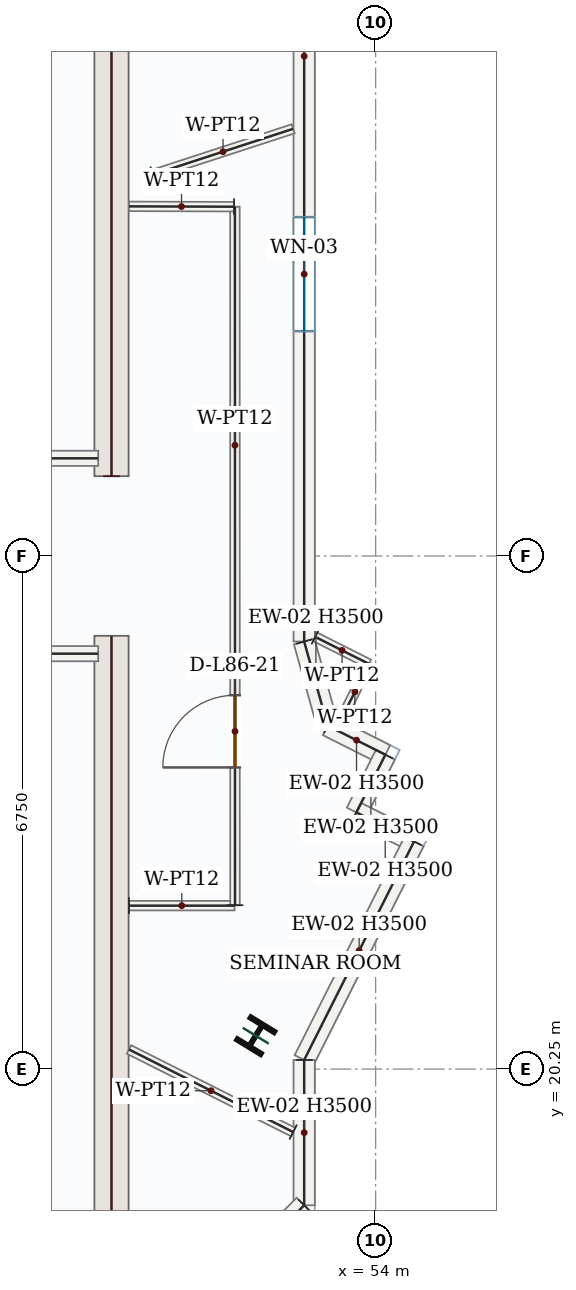
"""IFC4 building model, lengths in metres.
Left out: names, types, materials, properties, quantities, classifications, styles, units other than length and angle.
Written with IfcOpenShell. Run it as: python <this file> out.ifc"""

import sys

from ifc_helpers import new_model, si_unit, direction, frame, frame_2d, origin, origin_2d, place, context, subcontext, project, spatial, rectangle, i_section, extrude, source, transform, mapped, element, fill, save


model = new_model("IFC4")
c1 = context("Model", 3, precision=1e-05, world=origin(), true_north=direction((0.0, 1.0)))
c2 = subcontext(c1, "Body", "Model", "MODEL_VIEW")
j1 = project(units=[si_unit("LENGTHUNIT", "METRE"), si_unit("PLANEANGLEUNIT", "RADIAN")], contexts=[c1])
p1 = place(None, origin())
s1 = spatial("IfcSite", under=j1, at=p1, CompositionType="ELEMENT")
p2 = place(p1, origin())
s2 = spatial("IfcBuilding", under=s1, at=p2, CompositionType="ELEMENT")
p3 = place(p2, frame((0.0, 0.0, 353.55)))
s3 = spatial("IfcBuildingStorey", under=s2, at=p3, CompositionType="ELEMENT", Elevation=353.55)
m1 = source(origin(), c2, "Body", "SweptSolid", [
    extrude(rectangle(XDim=8.55, YDim=0.45, at=frame_2d((4.275, 0.0))), origin(), (0.0, 0.0, 1.0), 3.5),
])
for number, where, z_axis, x_axis in (
    (1, (50.525, 17.4, 0.0), (0.0, 0.0, 1.0), (0.0, 1.0, 0.0)),
    (2, (50.525, 28.05, 0.0), (0.0, 0.0, 1.0), (0.0, 1.0, 0.0)),
):
    element("IfcWall", number, at=place(p3, frame(where, z_axis=z_axis, x_axis=x_axis)), inside=s3, PredefinedType="SHEAR", context=c2, shape_type="MappedRepresentation", body=[
        mapped(m1, transform((0.0, 0.0, 0.0), x_axis=(1.0, 0.0, 0.0), y_axis=(0.0, 1.0, 0.0), z_axis=(0.0, 0.0, 1.0), scale=1.0)),
    ])
m2 = source(origin(), c2, "Body", "SweptSolid", [
    extrude(i_section(OverallWidth=0.369, OverallDepth=0.356, WebThickness=0.011, FlangeThickness=0.018, FilletRadius=0.018, at=origin_2d()), origin(), (0.0, 0.0, 1.0), 3.75),
])
p4 = place(p3, frame((52.423, 20.689, 0.0), z_axis=(0.0, 0.0, 1.0), x_axis=(-0.852640164354, 0.522498564716, 0.0)))
e3 = element("IfcColumn", 3, at=p4, inside=s3, PredefinedType="COLUMN", context=c2, shape_type="MappedRepresentation", body=[
    mapped(m2, transform((0.0, 0.0, 0.0), x_axis=(1.0, 0.0, 0.0), y_axis=(0.0, 1.0, 0.0), z_axis=(0.0, 0.0, 1.0), scale=1.0)),
])
p5 = place(p3, frame((53.06, 35.542, 0.0), z_axis=(0.0, 0.0, 1.0), x_axis=(0.0, -1.0, 0.0)))
e4 = element("IfcWall", 4, at=p5, inside=s3, PredefinedType="SOLIDWALL", context=c2, shape_type="SweptSolid", body=[
    extrude(rectangle(XDim=9.667, YDim=0.28, at=frame_2d((4.834, 0.0))), origin(), (0.0, 0.0, 1.0), 3.5),
])
p6 = place(p5, frame((4.084, 0.0, 0.85)))
e5 = element("IfcOpeningElement", 5, at=p6, cuts=e4, PredefinedType="OPENING", context=c2, shape_type="SweptSolid", body=[
    extrude(rectangle(XDim=1.5, YDim=1.5, at=frame_2d((0.75, 0.75))), frame((0.0, 0.15, 0.0), z_axis=(0.0, -1.0, 0.0), x_axis=(1.0, 0.0, 0.0)), (0.0, 0.0, 1.0), 0.3),
])
m3 = source(origin(), c2, "Body", "SweptSolid", [
    extrude(rectangle(XDim=1.149, YDim=0.28, at=frame_2d((0.575, 0.0))), origin(), (0.0, 0.0, 1.0), 3.5),
])
p7 = place(p3, frame((53.06, 25.875, 0.0), z_axis=(0.0, 0.0, 1.0), x_axis=(0.268739381154, -0.963212928182, 0.0)))
e6 = element("IfcWall", 6, at=p7, inside=s3, PredefinedType="SOLIDWALL", context=c2, shape_type="MappedRepresentation", body=[
    mapped(m3, transform((0.0, 0.0, 0.0), x_axis=(1.0, 0.0, 0.0), y_axis=(0.0, 1.0, 0.0), z_axis=(0.0, 0.0, 1.0), scale=1.0)),
])
m4 = source(origin(), c2, "Body", "SweptSolid", [
    extrude(rectangle(XDim=0.85, YDim=0.28, at=frame_2d((0.425, 0.0))), origin(), (0.0, 0.0, 1.0), 3.5),
])
p8 = place(p3, frame((53.369, 24.768, 0.0), z_axis=(0.0, 0.0, 1.0), x_axis=(0.893448612452, -0.449165422653, 0.0)))
e7 = element("IfcWall", 7, at=p8, inside=s3, PredefinedType="SOLIDWALL", context=c2, shape_type="MappedRepresentation", body=[
    mapped(m4, transform((0.0, 0.0, 0.0), x_axis=(1.0, 0.0, 0.0), y_axis=(0.0, 1.0, 0.0), z_axis=(0.0, 0.0, 1.0), scale=1.0)),
])
m5 = source(origin(), c2, "Body", "SweptSolid", [
    extrude(rectangle(XDim=0.85, YDim=0.28, at=frame_2d((0.425, 0.0))), origin(), (0.0, 0.0, 1.0), 3.5),
])
p9 = place(p3, frame((54.128, 24.386, 0.0), z_axis=(0.0, 0.0, 1.0), x_axis=(-0.449280699695, -0.89339064965, 0.0)))
e8 = element("IfcWall", 8, at=p9, inside=s3, PredefinedType="SOLIDWALL", context=c2, shape_type="MappedRepresentation", body=[
    mapped(m5, transform((0.0, 0.0, 0.0), x_axis=(1.0, 0.0, 0.0), y_axis=(0.0, 1.0, 0.0), z_axis=(0.0, 0.0, 1.0), scale=1.0)),
])
p10 = place(p3, frame((53.747, 23.626, 0.0), z_axis=(0.0, 0.0, 1.0), x_axis=(0.893275332233, -0.449509934066, 0.0)))
e9 = element("IfcWall", 9, at=p10, inside=s3, PredefinedType="SOLIDWALL", context=c2, shape_type="MappedRepresentation", body=[
    mapped(m4, transform((0.0, 0.0, 0.0), x_axis=(1.0, 0.0, 0.0), y_axis=(0.0, 1.0, 0.0), z_axis=(0.0, 0.0, 1.0), scale=1.0)),
])
m6 = source(origin(), c2, "Body", "SweptSolid", [
    extrude(rectangle(XDim=3.218, YDim=0.28, at=frame_2d((1.609, 0.0))), origin(), (0.0, 0.0, 1.0), 3.5),
])
p11 = place(p3, frame((54.506, 23.244, 0.0), z_axis=(0.0, 0.0, 1.0), x_axis=(-0.449336858059, -0.89336240574, 0.0)))
e10 = element("IfcWall", 10, at=p11, inside=s3, PredefinedType="SOLIDWALL", context=c2, shape_type="MappedRepresentation", body=[
    mapped(m6, transform((0.0, 0.0, 0.0), x_axis=(1.0, 0.0, 0.0), y_axis=(0.0, 1.0, 0.0), z_axis=(0.0, 0.0, 1.0), scale=1.0)),
])
m7 = source(origin(), c2, "Body", "SweptSolid", [
    extrude(rectangle(XDim=1.912, YDim=0.28, at=frame_2d((0.956, 0.0))), origin(), (0.0, 0.0, 1.0), 3.5),
])
p12 = place(p3, frame((53.06, 20.37, 0.0), z_axis=(0.0, 0.0, 1.0), x_axis=(0.0, -1.0, 0.0)))
e11 = element("IfcWall", 11, at=p12, inside=s3, PredefinedType="SOLIDWALL", context=c2, shape_type="MappedRepresentation", body=[
    mapped(m7, transform((0.0, 0.0, 0.0), x_axis=(1.0, 0.0, 0.0), y_axis=(0.0, 1.0, 0.0), z_axis=(0.0, 0.0, 1.0), scale=1.0)),
])
m8 = source(origin(), c2, "Body", "SweptSolid", [
    extrude(rectangle(XDim=2.736, YDim=0.28, at=frame_2d((1.368, 0.0))), origin(), (0.0, 0.0, 1.0), 3.5),
])
p13 = place(p3, frame((53.06, 18.458, 0.0), z_axis=(0.0, 0.0, 1.0), x_axis=(-0.707106781187, -0.707106781187, 0.0)))
e12 = element("IfcWall", 12, at=p13, inside=s3, PredefinedType="SOLIDWALL", context=c2, shape_type="MappedRepresentation", body=[
    mapped(m8, transform((0.0, 0.0, 0.0), x_axis=(1.0, 0.0, 0.0), y_axis=(0.0, 1.0, 0.0), z_axis=(0.0, 0.0, 1.0), scale=1.0)),
])
m9 = source(origin(), c2, "Body", "SweptSolid", [
    extrude(rectangle(XDim=4.25, YDim=0.2, at=frame_2d((2.125, 0.0))), origin(), (0.0, 0.0, 1.0), 3.5),
])
for number, where, z_axis, x_axis in (
    (13, (46.1, 25.715, 0.0), (0.0, 0.0, 1.0), (1.0, 0.0, 0.0)),
    (14, (46.1, 28.285, 0.0), (0.0, 0.0, 1.0), (1.0, 0.0, 0.0)),
):
    element("IfcWall", number, at=place(p3, frame(where, z_axis=z_axis, x_axis=x_axis)), inside=s3, PredefinedType="SOLIDWALL", context=c2, shape_type="MappedRepresentation", body=[
        mapped(m9, transform((0.0, 0.0, 0.0), x_axis=(1.0, 0.0, 0.0), y_axis=(0.0, 1.0, 0.0), z_axis=(0.0, 0.0, 1.0), scale=1.0)),
    ])
m10 = source(origin(), c2, "Body", "SweptSolid", [
    extrude(rectangle(XDim=1.389, YDim=0.125, at=frame_2d((0.695, 0.0))), origin(), (0.0, 0.0, 1.0), 3.5),
])
p14 = place(p3, frame((50.755, 22.4, 0.0), z_axis=(0.0, 0.0, 1.0), x_axis=(1.0, 0.0, 0.0)))
e15 = element("IfcWall", 15, at=p14, inside=s3, PredefinedType="PARTITIONING", context=c2, shape_type="MappedRepresentation", body=[
    mapped(m10, transform((0.0, 0.0, 0.0), x_axis=(1.0, 0.0, 0.0), y_axis=(0.0, 1.0, 0.0), z_axis=(0.0, 0.0, 1.0), scale=1.0)),
])
p15 = place(p3, frame((52.15, 22.406, 0.0), z_axis=(0.0, 0.0, 1.0), x_axis=(-0.000132840935, 0.999999991177, 0.0)))
e16 = element("IfcWall", 16, at=p15, inside=s3, PredefinedType="PARTITIONING", context=c2, shape_type="SweptSolid", body=[
    extrude(rectangle(XDim=9.189, YDim=0.125, at=frame_2d((4.595, 0.0))), origin(), (0.0, 0.0, 1.0), 3.5),
])
p16 = place(p15, frame((1.812, 0.0, 0.0)))
e17 = element("IfcOpeningElement", 17, at=p16, cuts=e16, PredefinedType="OPENING", context=c2, shape_type="SweptSolid", body=[
    extrude(rectangle(XDim=0.95, YDim=2.15, at=frame_2d((0.475, 1.075))), frame((0.0, 0.073, 0.0), z_axis=(0.0, -1.0, 0.0), x_axis=(1.0, 0.0, 0.0)), (0.0, 0.0, 1.0), 0.145),
])
m11 = source(origin(), c2, "Body", "SweptSolid", [
    extrude(rectangle(XDim=1.382, YDim=0.125, at=frame_2d((0.691, 0.0))), origin(), (0.0, 0.0, 1.0), 3.5),
])
p17 = place(p3, frame((52.137, 31.595, 0.0), z_axis=(0.0, 0.0, 1.0), x_axis=(-0.999994369671, 0.003355685804, 0.0)))
e18 = element("IfcWall", 18, at=p17, inside=s3, PredefinedType="PARTITIONING", context=c2, shape_type="MappedRepresentation", body=[
    mapped(m11, transform((0.0, 0.0, 0.0), x_axis=(1.0, 0.0, 0.0), y_axis=(0.0, 1.0, 0.0), z_axis=(0.0, 0.0, 1.0), scale=1.0)),
])
m12 = source(origin(), c2, "Body", "SweptSolid", [
    extrude(rectangle(XDim=1.94, YDim=0.125, at=frame_2d((0.97, 0.0))), origin(), (0.0, 0.0, 1.0), 3.5),
])
p18 = place(p3, frame((51.07, 32.019, 0.0), z_axis=(0.0, 0.0, 1.0), x_axis=(0.950812842577, 0.309765941303, 0.0)))
e19 = element("IfcWall", 19, at=p18, inside=s3, PredefinedType="PARTITIONING", context=c2, shape_type="MappedRepresentation", body=[
    mapped(m12, transform((0.0, 0.0, 0.0), x_axis=(1.0, 0.0, 0.0), y_axis=(0.0, 1.0, 0.0), z_axis=(0.0, 0.0, 1.0), scale=1.0)),
])
m13 = source(origin(), c2, "Body", "SweptSolid", [
    extrude(rectangle(XDim=0.791, YDim=0.125, at=frame_2d((0.396, 0.0))), origin(), (0.0, 0.0, 1.0), 3.5),
])
p19 = place(p3, frame((53.205, 25.936, 0.0), z_axis=(0.0, 0.0, 1.0), x_axis=(0.893437787625, -0.449186953999, 0.0)))
e20 = element("IfcWall", 20, at=p19, inside=s3, PredefinedType="PARTITIONING", context=c2, shape_type="MappedRepresentation", body=[
    mapped(m13, transform((0.0, 0.0, 0.0), x_axis=(1.0, 0.0, 0.0), y_axis=(0.0, 1.0, 0.0), z_axis=(0.0, 0.0, 1.0), scale=1.0)),
])
m14 = source(origin(), c2, "Body", "SweptSolid", [
    extrude(rectangle(XDim=0.825, YDim=0.125, at=frame_2d((0.413, 0.0))), origin(), (0.0, 0.0, 1.0), 3.5),
])
p20 = place(p3, frame((53.912, 25.581, 0.0), z_axis=(0.0, 0.0, 1.0), x_axis=(-0.449106057678, -0.893478454669, 0.0)))
e21 = element("IfcWall", 21, at=p20, inside=s3, PredefinedType="PARTITIONING", context=c2, shape_type="MappedRepresentation", body=[
    mapped(m14, transform((0.0, 0.0, 0.0), x_axis=(1.0, 0.0, 0.0), y_axis=(0.0, 1.0, 0.0), z_axis=(0.0, 0.0, 1.0), scale=1.0)),
])
m15 = source(origin(), c2, "Body", "SweptSolid", [
    extrude(rectangle(XDim=2.418, YDim=0.125, at=frame_2d((1.209, 0.0))), origin(), (0.0, 0.0, 1.0), 3.5),
])
p21 = place(p3, frame((52.915, 19.422, 0.0), z_axis=(0.0, 0.0, 1.0), x_axis=(-0.893374646663, 0.449312520078, 0.0)))
e22 = element("IfcWall", 22, at=p21, inside=s3, PredefinedType="PARTITIONING", context=c2, shape_type="MappedRepresentation", body=[
    mapped(m15, transform((0.0, 0.0, 0.0), x_axis=(1.0, 0.0, 0.0), y_axis=(0.0, 1.0, 0.0), z_axis=(0.0, 0.0, 1.0), scale=1.0)),
])
m16 = source(origin(), c2, "Body", "SweptSolid", [
    extrude(rectangle(XDim=1.5, YDim=1.5, at=frame_2d((0.75, 0.75))), frame((0.0, 0.03, 0.0), z_axis=(0.0, -1.0, 0.0), x_axis=(1.0, 0.0, 0.0)), (0.0, 0.0, 1.0), 0.06),
])
p22 = place(p6, origin())
e23 = element("IfcWindow", 23, at=p22, inside=s3, PartitioningType="SINGLE_PANEL", PredefinedType="WINDOW", context=c2, shape_type="MappedRepresentation", body=[
    mapped(m16, transform((0.0, 0.0, 0.0), x_axis=(1.0, 0.0, 0.0), y_axis=(0.0, 1.0, 0.0), z_axis=(0.0, 0.0, 1.0), scale=1.0)),
])
fill(e5, e23)
m17 = source(origin(), c2, "Body", "SweptSolid", [
    extrude(rectangle(XDim=0.95, YDim=2.15, at=frame_2d((0.475, 1.075))), frame((0.0, 0.025, 0.0), z_axis=(0.0, -1.0, 0.0), x_axis=(1.0, 0.0, 0.0)), (0.0, 0.0, 1.0), 0.05),
])
p23 = place(p16, origin())
e24 = element("IfcDoor", 24, at=p23, inside=s3, OperationType="SINGLE_SWING_LEFT", PredefinedType="DOOR", context=c2, shape_type="MappedRepresentation", body=[
    mapped(m17, transform((0.0, 0.0, 0.0), x_axis=(1.0, 0.0, 0.0), y_axis=(0.0, 1.0, 0.0), z_axis=(0.0, 0.0, 1.0), scale=1.0)),
])
fill(e17, e24)
save(model, sys.argv[1])
